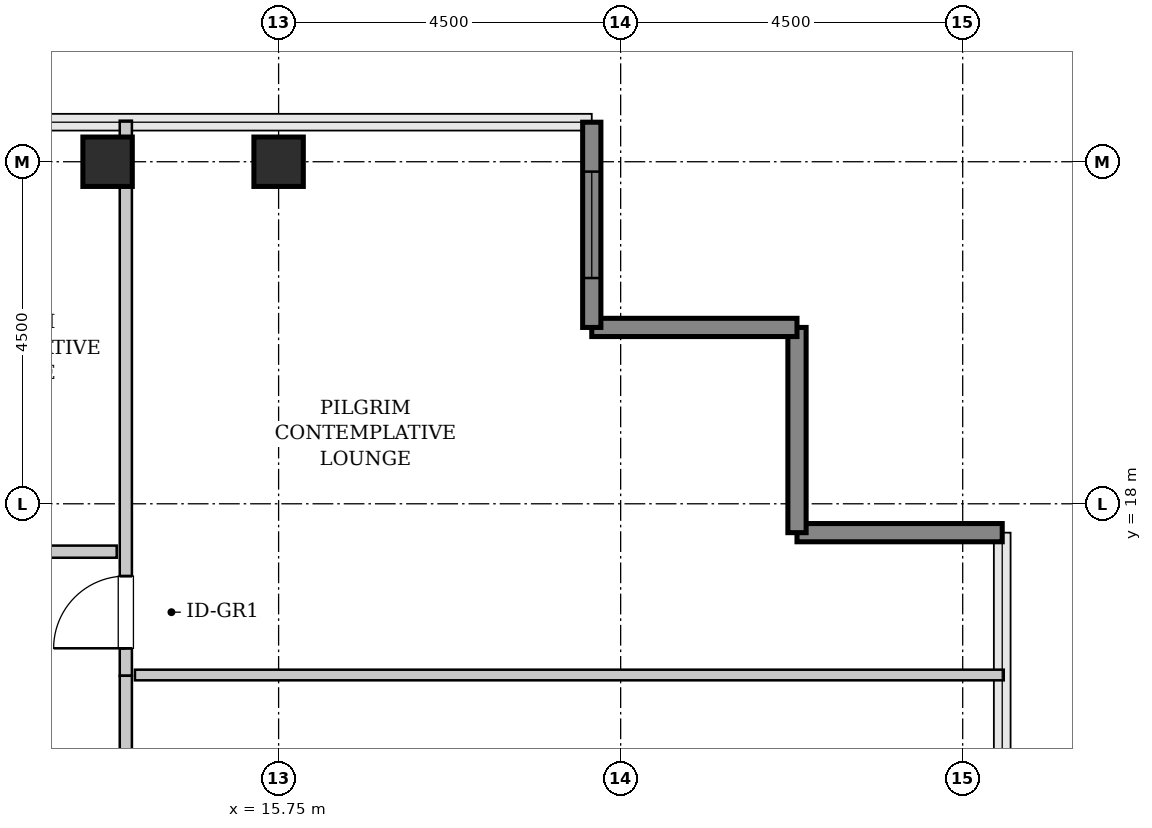
"""IFC4 building model, lengths in metres.
Left out: names, types, materials, properties, quantities, classifications, styles, units other than length and angle.
Written with IfcOpenShell. Run it as: python <this file> out.ifc"""

import sys

from ifc_helpers import new_model, si_unit, direction, frame, frame_2d, origin, origin_2d, place, context, subcontext, project, spatial, rectangle, hollow_rectangle, extrude, source, transform, mapped, element, fill, save


model = new_model("IFC4")
c1 = context("Model", 3, precision=1e-05, world=origin(), true_north=direction((0.0, 1.0)))
c2 = subcontext(c1, "Body", "Model", "MODEL_VIEW")
j1 = project(units=[si_unit("LENGTHUNIT", "METRE"), si_unit("PLANEANGLEUNIT", "RADIAN")], contexts=[c1])
p1 = place(None, origin())
s1 = spatial("IfcSite", under=j1, at=p1, CompositionType="ELEMENT")
p2 = place(p1, origin())
s2 = spatial("IfcBuilding", under=s1, at=p2, CompositionType="ELEMENT")
p3 = place(p2, frame((0.0, 0.0, 252.2)))
s3 = spatial("IfcBuildingStorey", under=s2, at=p3, CompositionType="ELEMENT", Elevation=252.2)
m1 = source(origin(), c2, "Body", "SweptSolid", [
    extrude(hollow_rectangle(XDim=0.65, YDim=0.65, WallThickness=0.032, InnerFilletRadius=0.032, OuterFilletRadius=0.064, at=origin_2d()), origin(), (0.0, 0.0, 1.0), 3.8),
])
for number, where, z_axis, x_axis in (
    (1, (13.5, 22.5, 0.0), (0.0, 0.0, 1.0), (1.0, 0.0, 0.0)),
    (2, (15.75, 22.5, 0.0), (0.0, 0.0, 1.0), (1.0, 0.0, 0.0)),
):
    element("IfcColumn", number, at=place(p3, frame(where, z_axis=z_axis, x_axis=x_axis)), inside=s3, PredefinedType="COLUMN", context=c2, shape_type="MappedRepresentation", body=[
        mapped(m1, transform((0.0, 0.0, 0.0), x_axis=(1.0, 0.0, 0.0), y_axis=(0.0, 1.0, 0.0), z_axis=(0.0, 0.0, 1.0), scale=1.0)),
    ])
m2 = source(origin(), c2, "Body", "SweptSolid", [
    extrude(rectangle(XDim=2.7, YDim=0.24, at=frame_2d((1.35, 0.0))), origin(), (0.0, 0.0, 1.0), 3.55),
])
for number, where, z_axis, x_axis in (
    (3, (25.27, 17.62, 0.0), (0.0, 0.0, 1.0), (-1.0, 0.0, 0.0)),
    (4, (22.57, 17.62, 0.0), (0.0, 0.0, 1.0), (0.0, 1.0, 0.0)),
    (5, (22.57, 20.32, 0.0), (0.0, 0.0, 1.0), (-1.0, 0.0, 0.0)),
):
    element("IfcWall", number, at=place(p3, frame(where, z_axis=z_axis, x_axis=x_axis)), inside=s3, PredefinedType="SHEAR", context=c2, shape_type="MappedRepresentation", body=[
        mapped(m2, transform((0.0, 0.0, 0.0), x_axis=(1.0, 0.0, 0.0), y_axis=(0.0, 1.0, 0.0), z_axis=(0.0, 0.0, 1.0), scale=1.0)),
    ])
p4 = place(p3, frame((19.87, 20.32, 0.0), z_axis=(0.0, 0.0, 1.0), x_axis=(0.0, 1.0, 0.0)))
e6 = element("IfcWall", 6, at=p4, inside=s3, PredefinedType="SHEAR", context=c2, shape_type="MappedRepresentation", body=[
    mapped(m2, transform((0.0, 0.0, 0.0), x_axis=(1.0, 0.0, 0.0), y_axis=(0.0, 1.0, 0.0), z_axis=(0.0, 0.0, 1.0), scale=1.0)),
])
p5 = place(p4, frame((0.65, 0.0, 0.85)))
e7 = element("IfcOpeningElement", 7, at=p5, cuts=e6, PredefinedType="OPENING", context=c2, shape_type="SweptSolid", body=[
    extrude(rectangle(XDim=1.4, YDim=1.8, at=frame_2d((0.7, 0.9))), frame((0.0, 0.13, 0.0), z_axis=(0.0, -1.0, 0.0), x_axis=(1.0, 0.0, 0.0)), (0.0, 0.0, 1.0), 0.26),
])
m3 = source(origin(), c2, "Body", "SweptSolid", [
    extrude(rectangle(XDim=7.302, YDim=0.16, at=frame_2d((3.651, 0.0))), origin(), (0.0, 0.0, 1.0), 3.535),
])
p6 = place(p3, frame((13.74, 15.738, 0.0), z_axis=(0.0, 0.0, 1.0), x_axis=(0.0, 1.0, 0.0)))
e8 = element("IfcWall", 8, at=p6, inside=s3, PredefinedType="PARTITIONING", context=c2, shape_type="MappedRepresentation", body=[
    mapped(m3, transform((0.0, 0.0, 0.0), x_axis=(1.0, 0.0, 0.0), y_axis=(0.0, 1.0, 0.0), z_axis=(0.0, 0.0, 1.0), scale=1.0)),
])
p7 = place(p6, frame((0.361, 0.0, 0.0)))
e9 = element("IfcOpeningElement", 9, at=p7, cuts=e8, PredefinedType="OPENING", context=c2, shape_type="SweptSolid", body=[
    extrude(rectangle(XDim=0.95, YDim=2.1, at=frame_2d((0.475, 1.05))), frame((0.0, 0.09, 0.0), z_axis=(0.0, -1.0, 0.0), x_axis=(1.0, 0.0, 0.0)), (0.0, 0.0, 1.0), 0.18),
])
m4 = source(origin(), c2, "Body", "SweptSolid", [
    extrude(rectangle(XDim=11.43, YDim=0.14, at=frame_2d((5.715, 0.0))), origin(), (0.0, 0.0, 1.0), 3.535),
])
p8 = place(p3, frame((13.86, 15.748, 0.0), z_axis=(0.0, 0.0, 1.0), x_axis=(1.0, 0.0, 0.0)))
e10 = element("IfcWall", 10, at=p8, inside=s3, PredefinedType="PARTITIONING", context=c2, shape_type="MappedRepresentation", body=[
    mapped(m4, transform((0.0, 0.0, 0.0), x_axis=(1.0, 0.0, 0.0), y_axis=(0.0, 1.0, 0.0), z_axis=(0.0, 0.0, 1.0), scale=1.0)),
])
m5 = source(origin(), c2, "Body", "SweptSolid", [
    extrude(rectangle(XDim=7.242, YDim=0.16, at=frame_2d((3.621, 0.0))), origin(), (0.0, 0.0, 1.0), 3.535),
])
p9 = place(p3, frame((13.74, 8.495, 0.0), z_axis=(0.0, 0.0, 1.0), x_axis=(0.0, 1.0, 0.0)))
e11 = element("IfcWall", 11, at=p9, inside=s3, PredefinedType="PARTITIONING", context=c2, shape_type="MappedRepresentation", body=[
    mapped(m5, transform((0.0, 0.0, 0.0), x_axis=(1.0, 0.0, 0.0), y_axis=(0.0, 1.0, 0.0), z_axis=(0.0, 0.0, 1.0), scale=1.0)),
])
p10 = place(p9, frame((3.146, 0.0, 0.0)))
e12 = element("IfcOpeningElement", 12, at=p10, cuts=e11, PredefinedType="OPENING", context=c2, shape_type="SweptSolid", body=[
    extrude(rectangle(XDim=0.95, YDim=2.1, at=frame_2d((0.475, 1.05))), frame((0.0, 0.09, 0.0), z_axis=(0.0, -1.0, 0.0), x_axis=(1.0, 0.0, 0.0)), (0.0, 0.0, 1.0), 0.18),
])
m6 = source(origin(), c2, "Body", "SweptSolid", [
    extrude(rectangle(XDim=5.425, YDim=0.16, at=frame_2d((2.712, 0.0))), origin(), (0.0, 0.0, 1.0), 3.535),
])
p11 = place(p3, frame((8.195, 17.37, 0.0), z_axis=(0.0, 0.0, 1.0), x_axis=(1.0, 0.0, 0.0)))
e13 = element("IfcWall", 13, at=p11, inside=s3, PredefinedType="PARTITIONING", context=c2, shape_type="MappedRepresentation", body=[
    mapped(m6, transform((0.0, 0.0, 0.0), x_axis=(1.0, 0.0, 0.0), y_axis=(0.0, 1.0, 0.0), z_axis=(0.0, 0.0, 1.0), scale=1.0)),
])
p12 = place(p11, frame((1.611, 0.0, 0.0)))
e14 = element("IfcOpeningElement", 14, at=p12, cuts=e13, PredefinedType="OPENING", context=c2, shape_type="SweptSolid", body=[
    extrude(rectangle(XDim=0.95, YDim=2.1, at=frame_2d((0.475, 1.05))), frame((0.0, 0.09, 0.0), z_axis=(0.0, -1.0, 0.0), x_axis=(1.0, 0.0, 0.0)), (0.0, 0.0, 1.0), 0.18),
])
m7 = source(origin(), c2, "Body", "SweptSolid", [
    extrude(rectangle(XDim=1.4, YDim=1.8, at=frame_2d((0.7, 0.9))), frame((0.0, 0.03, 0.0), z_axis=(0.0, -1.0, 0.0), x_axis=(1.0, 0.0, 0.0)), (0.0, 0.0, 1.0), 0.06),
])
p13 = place(p5, origin())
e15 = element("IfcWindow", 15, at=p13, inside=s3, PartitioningType="SINGLE_PANEL", PredefinedType="WINDOW", context=c2, shape_type="MappedRepresentation", body=[
    mapped(m7, transform((0.0, 0.0, 0.0), x_axis=(1.0, 0.0, 0.0), y_axis=(0.0, 1.0, 0.0), z_axis=(0.0, 0.0, 1.0), scale=1.0)),
])
fill(e7, e15)
m8 = source(origin(), c2, "Body", "SweptSolid", [
    extrude(rectangle(XDim=0.95, YDim=2.1, at=frame_2d((0.475, 1.05))), frame((0.0, 0.025, 0.0), z_axis=(0.0, -1.0, 0.0), x_axis=(1.0, 0.0, 0.0)), (0.0, 0.0, 1.0), 0.05),
])
p14 = place(p7, origin())
e16 = element("IfcDoor", 16, at=p14, inside=s3, OperationType="SINGLE_SWING_LEFT", PredefinedType="DOOR", context=c2, shape_type="MappedRepresentation", body=[
    mapped(m8, transform((0.0, 0.0, 0.0), x_axis=(1.0, 0.0, 0.0), y_axis=(0.0, 1.0, 0.0), z_axis=(0.0, 0.0, 1.0), scale=1.0)),
])
fill(e9, e16)
save(model, sys.argv[1])
